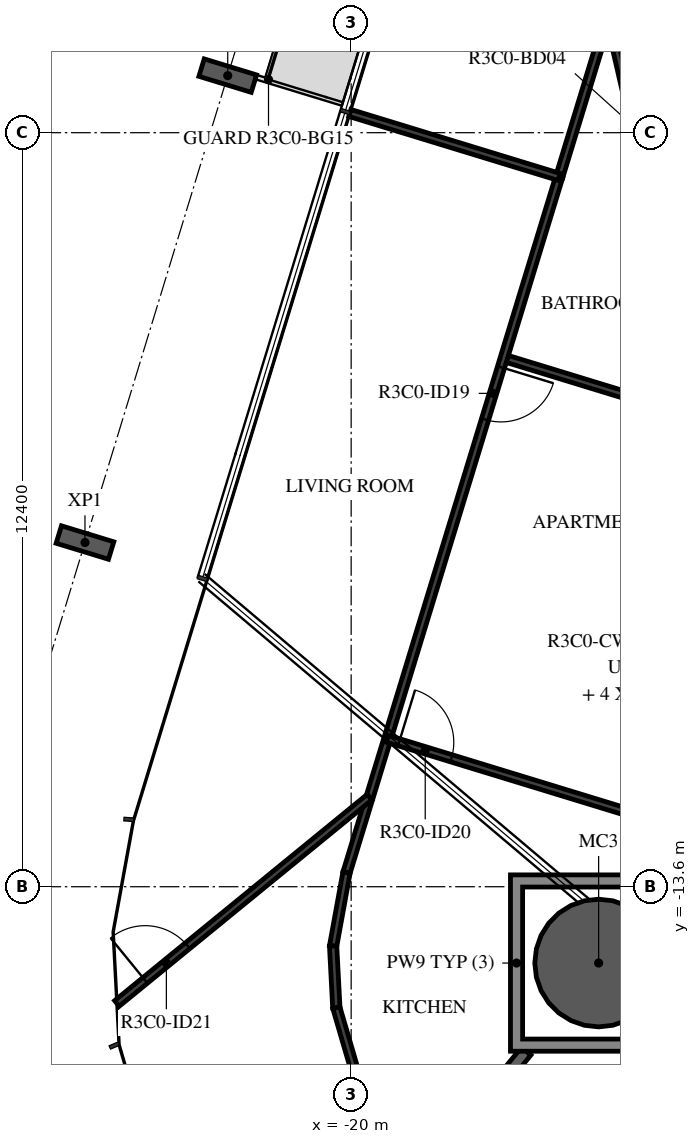
"""IFC4 building model, lengths in metres.
Left out: names, types, materials, properties, quantities, classifications, styles, units other than length and angle.
Written with IfcOpenShell. Run it as: python <this file> out.ifc"""

import sys

from ifc_helpers import new_model, si_unit, direction, frame, frame_2d, origin, origin_2d, place, context, subcontext, project, spatial, polyline, rectangle, hollow_circle, i_section, outline, extrude, element, fill, save


model = new_model("IFC4")
c1 = context("Model", 3, precision=1e-05, world=origin(), true_north=direction((0.0, 1.0)))
c2 = subcontext(c1, "Body", "Model", "MODEL_VIEW")
j1 = project(units=[si_unit("LENGTHUNIT", "METRE"), si_unit("PLANEANGLEUNIT", "RADIAN")], contexts=[c1])
p1 = place(None, origin())
s1 = spatial("IfcSite", under=j1, at=p1, CompositionType="ELEMENT")
p2 = place(p1, origin())
s2 = spatial("IfcBuilding", under=s1, at=p2, CompositionType="ELEMENT")
p3 = place(p2, frame((0.0, 0.0, 141.4)))
s3 = spatial("IfcBuildingStorey", under=s2, at=p3, CompositionType="ELEMENT", Elevation=141.4)
p4 = place(p3, frame((-15.93, -14.855, -0.38), z_axis=(0.0, 0.0, 1.0), x_axis=(1.0, 0.0, 0.0)))
e1 = element("IfcColumn", 1, at=p4, inside=s3, PredefinedType="COLUMN", context=c2, shape_type="SweptSolid", body=[
    extrude(hollow_circle(Radius=1.05, WallThickness=0.05, at=origin_2d()), origin(), (0.0, 0.0, 1.0), 2.616),
])
for number, where, z_axis, x_axis in (
    (2, (-22.03, -0.261, -0.38), (0.0, 0.0, 1.0), (0.292, 0.956, 0.0)),
    (3, (-24.377, -7.94, -0.38), (0.0, 0.0, 1.0), (0.292, 0.956, 0.0)),
):
    element("IfcColumn", number, at=place(p3, frame(where, z_axis=z_axis, x_axis=x_axis)), inside=s3, PredefinedType="COLUMN", context=c2, shape_type="SweptSolid", body=[
        extrude(i_section(OverallWidth=0.3, OverallDepth=0.9, WebThickness=0.019, FlangeThickness=0.035, FilletRadius=0.03, at=origin_2d()), origin(), (0.0, 0.0, 1.0), 2.616),
    ])
p5 = place(p3, frame((-21.0, -21.025, 0.0), z_axis=(0.0, 0.0, 1.0), x_axis=(0.634846795952, 0.772638043116, 0.0)))
e4 = element("IfcWall", 4, at=p5, inside=s3, PredefinedType="STANDARD", context=c2, shape_type="SweptSolid", body=[
    extrude(rectangle(XDim=6.109, YDim=0.2, at=frame_2d((3.055, 0.0))), origin(), (0.0, 0.0, 1.0), 3.05),
])
p6 = place(p3, frame((-15.727, 0.549, 0.0), z_axis=(0.0, 0.0, 1.0), x_axis=(0.224948441297, -0.974370668051, 0.0)))
e5 = element("IfcWall", 5, at=p6, inside=s3, PredefinedType="PARTITIONING", context=c2, shape_type="SweptSolid", body=[
    extrude(rectangle(XDim=6.616, YDim=0.12, at=frame_2d((3.308, 0.0))), origin(), (0.0, 0.0, 1.0), 3.05),
])
p7 = place(p6, frame((1.3, 0.0, 0.0)))
e6 = element("IfcOpeningElement", 6, at=p7, cuts=e5, PredefinedType="OPENING", context=c2, shape_type="SweptSolid", body=[
    extrude(rectangle(XDim=0.8, YDim=2.1, at=frame_2d((0.4, 1.05))), frame((0.0, 0.07, 0.0), z_axis=(0.0, -1.0, 0.0), x_axis=(1.0, 0.0, 0.0)), (0.0, 0.0, 1.0), 0.14),
])
p8 = place(p3, frame((-14.238, -5.897, 0.0), z_axis=(0.0, 0.0, 1.0), x_axis=(-0.956314762513, 0.292338972768, 0.0)))
e7 = element("IfcWall", 7, at=p8, inside=s3, PredefinedType="PARTITIONING", context=c2, shape_type="SweptSolid", body=[
    extrude(rectangle(XDim=3.399, YDim=0.12, at=frame_2d((1.699, 0.0))), origin(), (0.0, 0.0, 1.0), 3.05),
])
p9 = place(p3, frame((-16.579, -1.928, 0.0), z_axis=(0.0, 0.0, 1.0), x_axis=(-0.29236733738, -0.956306091183, 0.0)))
e8 = element("IfcWall", 8, at=p9, inside=s3, PredefinedType="PARTITIONING", context=c2, shape_type="SweptSolid", body=[
    extrude(rectangle(XDim=11.963, YDim=0.12, at=frame_2d((5.981, 0.0))), origin(), (0.0, 0.0, 1.0), 3.05),
])
p10 = place(p9, frame((3.271, 0.0, 0.0)))
e9 = element("IfcOpeningElement", 9, at=p10, cuts=e8, PredefinedType="OPENING", context=c2, shape_type="SweptSolid", body=[
    extrude(rectangle(XDim=0.9, YDim=2.1, at=frame_2d((0.45, 1.05))), frame((0.0, 0.07, 0.0), z_axis=(0.0, -1.0, 0.0), x_axis=(1.0, 0.0, 0.0)), (0.0, 0.0, 1.0), 0.14),
])
p11 = place(p3, frame((-19.404, -11.167, 0.0), z_axis=(0.0, 0.0, 1.0), x_axis=(0.956314306829, -0.292340463423, 0.0)))
e10 = element("IfcWall", 10, at=p11, inside=s3, PredefinedType="PARTITIONING", context=c2, shape_type="SweptSolid", body=[
    extrude(rectangle(XDim=5.85, YDim=0.12, at=frame_2d((2.925, 0.0))), origin(), (0.0, 0.0, 1.0), 3.05),
])
p12 = place(p11, frame((0.2, 0.0, 0.0)))
e11 = element("IfcOpeningElement", 11, at=p12, cuts=e10, PredefinedType="OPENING", context=c2, shape_type="SweptSolid", body=[
    extrude(rectangle(XDim=0.9, YDim=2.1, at=frame_2d((0.45, 1.05))), frame((0.0, 0.07, 0.0), z_axis=(0.0, -1.0, 0.0), x_axis=(1.0, 0.0, 0.0)), (0.0, 0.0, 1.0), 0.14),
])
p13 = place(p3, frame((-16.579, -1.928, 0.0), z_axis=(0.0, 0.0, 1.0), x_axis=(0.292418780126, 0.956290362301, 0.0)))
e12 = element("IfcWall", 12, at=p13, inside=s3, PredefinedType="PARTITIONING", context=c2, shape_type="SweptSolid", body=[
    extrude(rectangle(XDim=3.438, YDim=0.12, at=frame_2d((1.719, 0.0))), origin(), (0.0, 0.0, 1.0), 3.05),
])
p14 = place(p3, frame((-20.022, -0.875, 0.0), z_axis=(0.0, 0.0, 1.0), x_axis=(0.956306810244, -0.292364985388, 0.0)))
e13 = element("IfcWall", 13, at=p14, inside=s3, PredefinedType="PARTITIONING", context=c2, shape_type="SweptSolid", body=[
    extrude(rectangle(XDim=3.6, YDim=0.12, at=frame_2d((1.8, 0.0))), origin(), (0.0, 0.0, 1.0), 3.05),
])
p15 = place(p3, frame((-23.852, -15.52, 0.0), z_axis=(0.0, 0.0, 1.0), x_axis=(0.774546990858, 0.632516370502, 0.0)))
e14 = element("IfcWall", 14, at=p15, inside=s3, PredefinedType="PARTITIONING", context=c2, shape_type="SweptSolid", body=[
    extrude(rectangle(XDim=5.365, YDim=0.12, at=frame_2d((2.682, 0.0))), origin(), (0.0, 0.0, 1.0), 3.05),
])
p16 = place(p15, frame((0.6, 0.0, 0.0)))
e15 = element("IfcOpeningElement", 15, at=p16, cuts=e14, PredefinedType="OPENING", context=c2, shape_type="SweptSolid", body=[
    extrude(rectangle(XDim=0.9, YDim=2.1, at=frame_2d((0.45, 1.05))), frame((0.0, 0.07, 0.0), z_axis=(0.0, -1.0, 0.0), x_axis=(1.0, 0.0, 0.0)), (0.0, 0.0, 1.0), 0.14),
])
p17 = place(p3, frame((-20.077, -13.368, 0.0), z_axis=(0.0, 0.0, 1.0), x_axis=(-0.179288174895, -0.983796600087, 0.0)))
e16 = element("IfcWall", 16, at=p17, inside=s3, PredefinedType="PARTITIONING", context=c2, shape_type="SweptSolid", body=[
    extrude(rectangle(XDim=1.227, YDim=0.12, at=frame_2d((0.613, 0.0))), origin(), (0.0, 0.0, 1.0), 3.05),
])
p18 = place(p3, frame((-20.297, -14.575, 0.0), z_axis=(0.0, 0.0, 1.0), x_axis=(0.052142637988, -0.998639647372, 0.0)))
e17 = element("IfcWall", 17, at=p18, inside=s3, PredefinedType="PARTITIONING", context=c2, shape_type="SweptSolid", body=[
    extrude(rectangle(XDim=1.016, YDim=0.12, at=frame_2d((0.508, 0.0))), origin(), (0.0, 0.0, 1.0), 3.05),
])
p19 = place(p3, frame((-20.244, -15.59, 0.0), z_axis=(0.0, 0.0, 1.0), x_axis=(0.281411609627, -0.959587153919, 0.0)))
e18 = element("IfcWall", 18, at=p19, inside=s3, PredefinedType="PARTITIONING", context=c2, shape_type="SweptSolid", body=[
    extrude(rectangle(XDim=1.016, YDim=0.12, at=frame_2d((0.508, 0.0))), origin(), (0.0, 0.0, 1.0), 3.05),
])
p20 = place(p3, origin())
e19 = element("IfcWall", 19, at=p20, inside=s3, PredefinedType="STANDARD", context=c2, shape_type="SweptSolid", body=[
    extrude(outline(polyline([(-14.48, -13.405), (-14.48, -16.305), (-17.38, -16.305), (-17.38, -13.405), (-14.48, -13.405)]), holes=[polyline([(-17.18, -16.105), (-14.68, -16.105), (-14.68, -13.605), (-17.18, -13.605), (-17.18, -16.105)])]), origin(), (0.0, 0.0, 1.0), 3.05),
])
p21 = place(p10, origin())
e20 = element("IfcDoor", 20, at=p21, inside=s3, OperationType="SINGLE_SWING_RIGHT", PredefinedType="DOOR", context=c2, shape_type="SweptSolid", body=[
    extrude(rectangle(XDim=0.9, YDim=2.1, at=frame_2d((0.45, 1.05))), frame((0.0, 0.025, 0.0), z_axis=(0.0, -1.0, 0.0), x_axis=(1.0, 0.0, 0.0)), (0.0, 0.0, 1.0), 0.05),
])
fill(e9, e20)
p22 = place(p12, origin())
e21 = element("IfcDoor", 21, at=p22, inside=s3, OperationType="SINGLE_SWING_RIGHT", PredefinedType="DOOR", context=c2, shape_type="SweptSolid", body=[
    extrude(rectangle(XDim=0.9, YDim=2.1, at=frame_2d((0.45, 1.05))), frame((0.0, 0.025, 0.0), z_axis=(0.0, -1.0, 0.0), x_axis=(1.0, 0.0, 0.0)), (0.0, 0.0, 1.0), 0.05),
])
fill(e11, e21)
p23 = place(p16, origin())
e22 = element("IfcDoor", 22, at=p23, inside=s3, OperationType="SINGLE_SWING_RIGHT", PredefinedType="DOOR", context=c2, shape_type="SweptSolid", body=[
    extrude(rectangle(XDim=0.9, YDim=2.1, at=frame_2d((0.45, 1.05))), frame((0.0, 0.025, 0.0), z_axis=(0.0, -1.0, 0.0), x_axis=(1.0, 0.0, 0.0)), (0.0, 0.0, 1.0), 0.05),
])
fill(e15, e22)
save(model, sys.argv[1])
